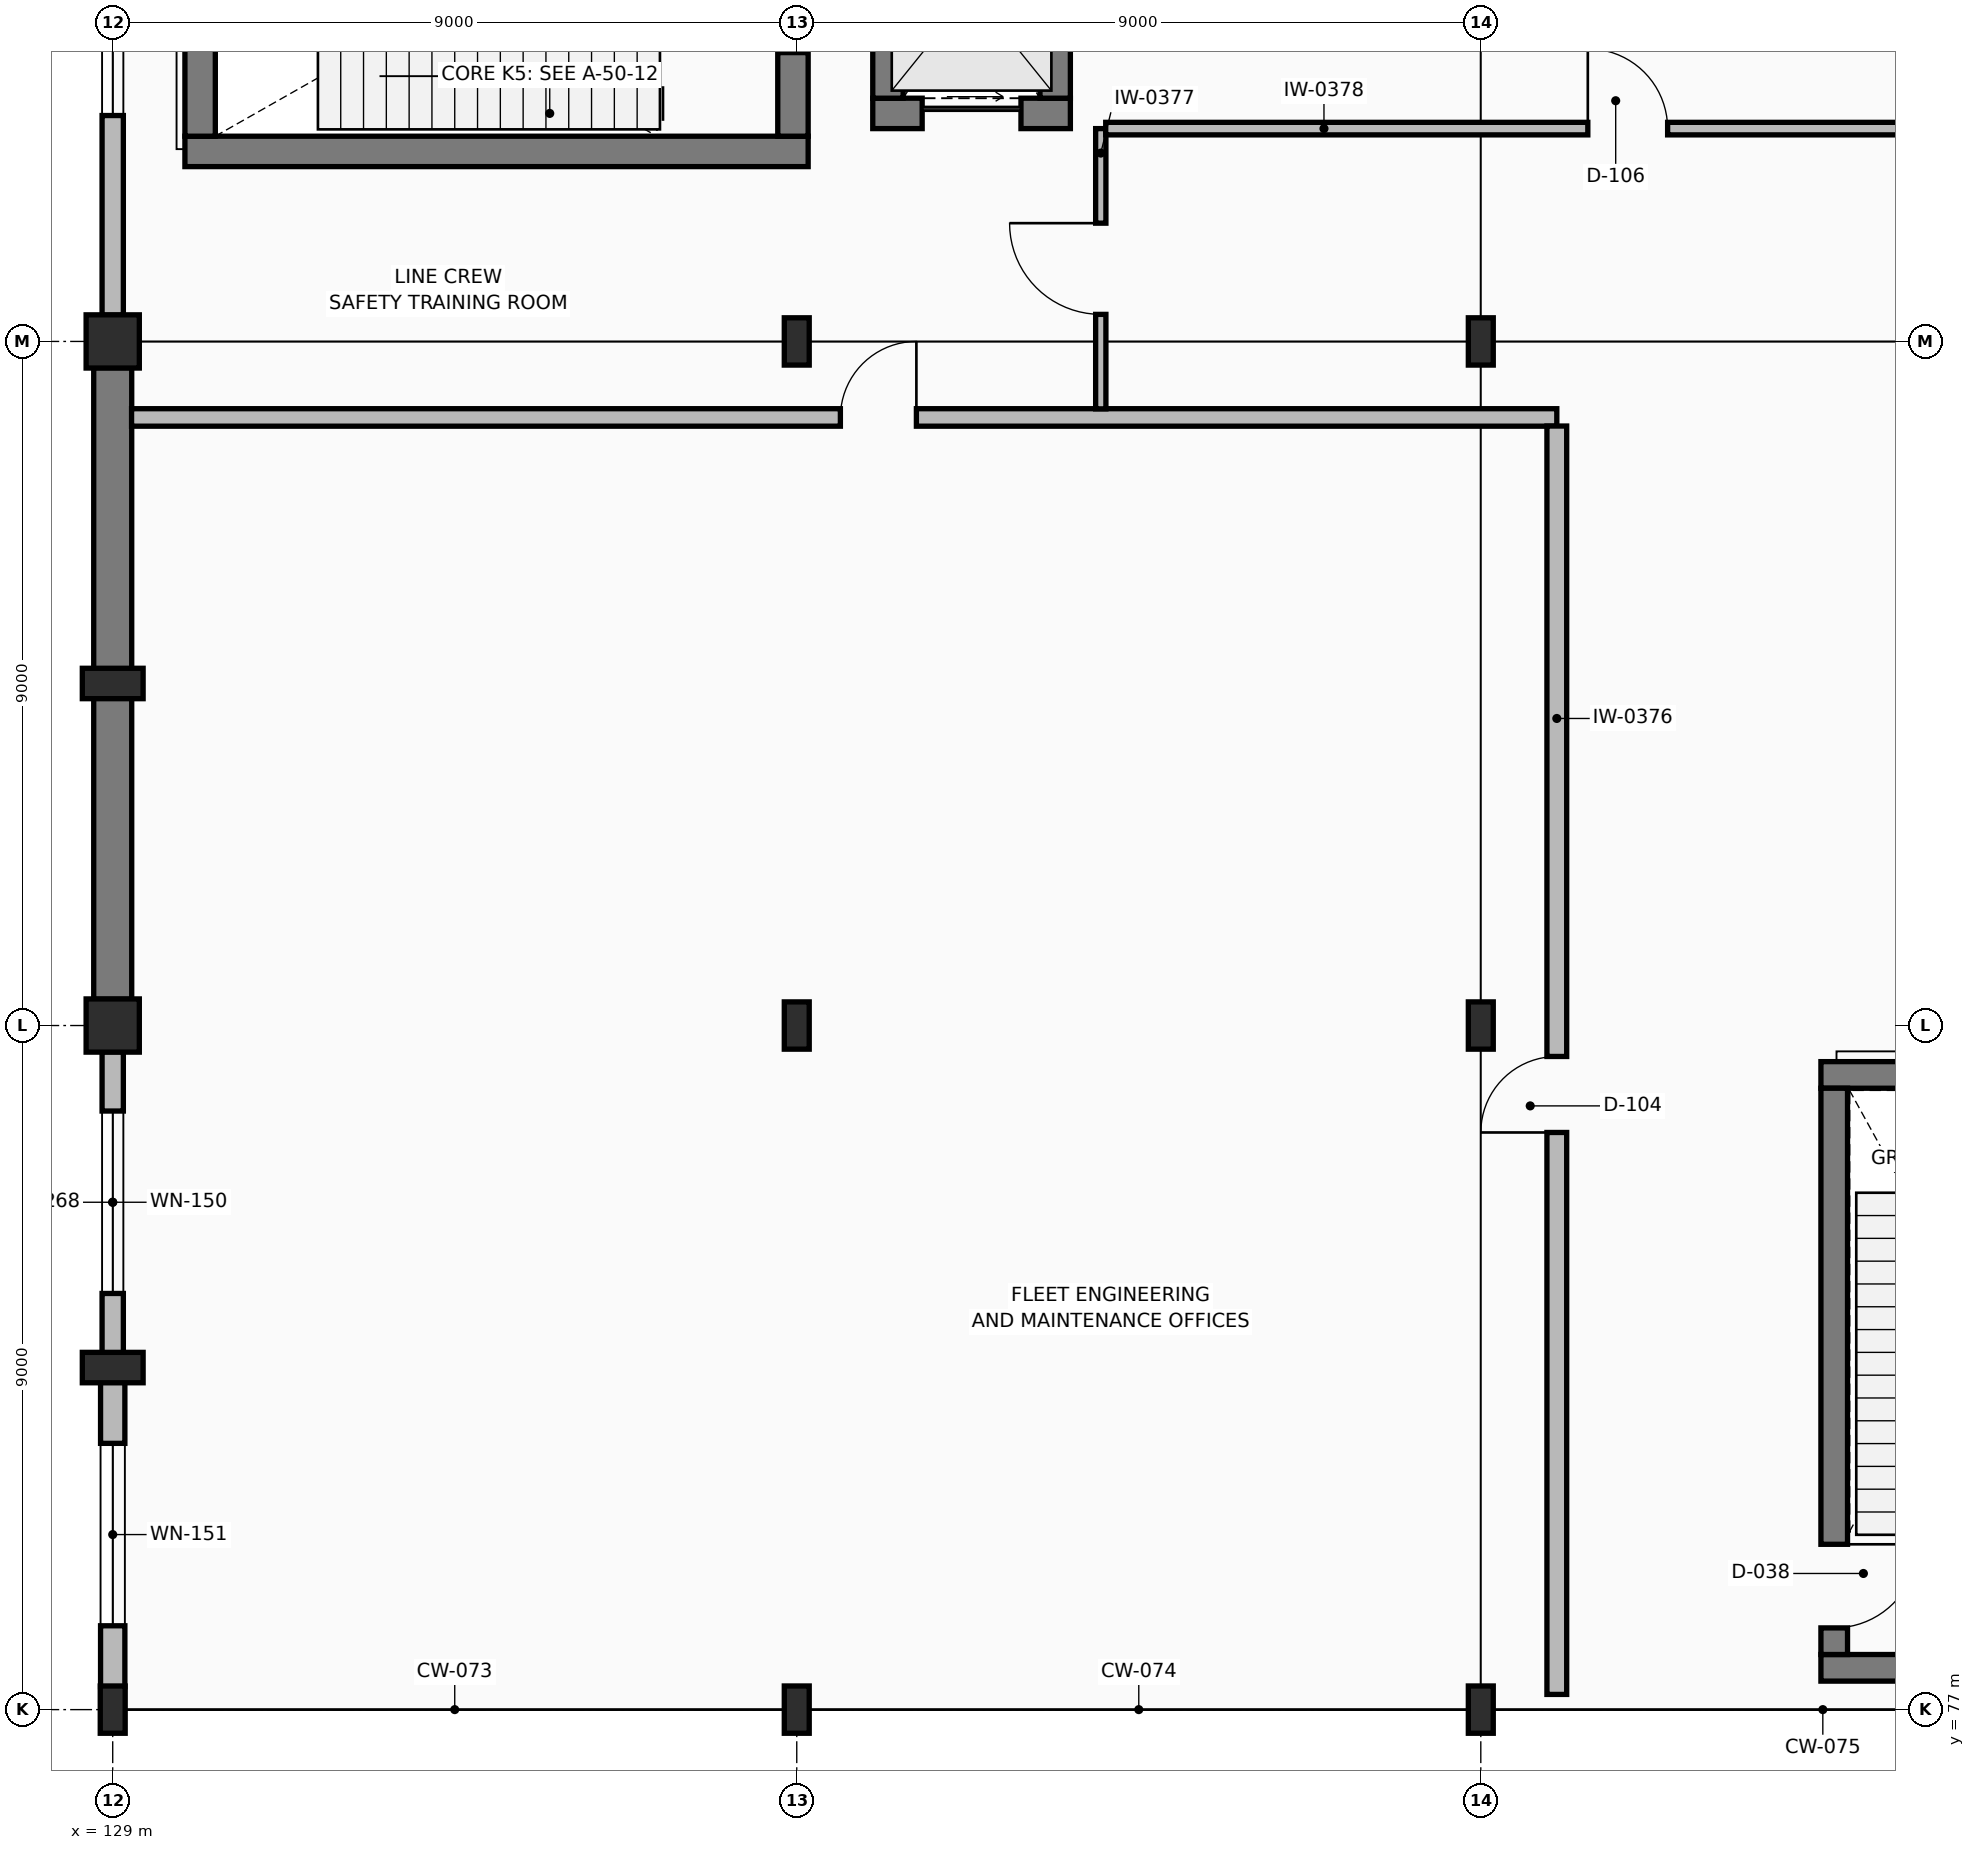
"""IFC4 building model, lengths in metres.
Left out: names, types, materials, properties, quantities, classifications, styles, units other than length and angle.
Written with IfcOpenShell. Run it as: python <this file> out.ifc"""

import sys

from ifc_helpers import new_model, si_unit, direction, frame, frame_2d, origin, origin_2d, place, context, subcontext, project, spatial, rectangle, i_section, extrude, element, fill, save


model = new_model("IFC4")
c1 = context("Model", 3, precision=1e-05, world=origin(), true_north=direction((0.0, 1.0)))
c2 = subcontext(c1, "Body", "Model", "MODEL_VIEW")
j1 = project(units=[si_unit("LENGTHUNIT", "METRE"), si_unit("PLANEANGLEUNIT", "RADIAN")], contexts=[c1])
p1 = place(None, origin())
s1 = spatial("IfcSite", under=j1, at=p1, CompositionType="ELEMENT")
p2 = place(p1, origin())
s2 = spatial("IfcBuilding", under=s1, at=p2, CompositionType="ELEMENT")
p3 = place(p2, frame((0.0, 0.0, 4.8)))
s3 = spatial("IfcBuildingStorey", under=s2, at=p3, CompositionType="ELEMENT", Elevation=4.8)
p4 = place(p3, frame((129.0, 77.0, 0.0), z_axis=(0.0, 0.0, 1.0), x_axis=(1.0, 0.0, 0.0)))
e1 = element("IfcColumn", 1, at=p4, inside=s3, PredefinedType="COLUMN", context=c2, shape_type="SweptSolid", body=[
    extrude(i_section(OverallWidth=0.328, OverallDepth=0.622, WebThickness=0.015, FlangeThickness=0.024, at=origin_2d()), origin(), (0.0, 0.0, 1.0), 4.8),
])
for number, where, z_axis, x_axis in (
    (2, (129.0, 86.0, 0.0), (0.0, 0.0, 1.0), (1.0, 0.0, 0.0)),
    (3, (129.0, 95.0, 0.0), (0.0, 0.0, 1.0), (1.0, 0.0, 0.0)),
):
    element("IfcColumn", number, at=place(p3, frame(where, z_axis=z_axis, x_axis=x_axis)), inside=s3, PredefinedType="COLUMN", context=c2, shape_type="SweptSolid", body=[
        extrude(rectangle(XDim=0.7, YDim=0.7, at=origin_2d()), origin(), (0.0, 0.0, 1.0), 4.8),
    ])
for number, where, z_axis, x_axis in (
    (4, (138.0, 77.0, 0.0), (0.0, 0.0, 1.0), (1.0, 0.0, 0.0)),
    (5, (138.0, 86.0, 0.0), (0.0, 0.0, 1.0), (1.0, 0.0, 0.0)),
    (6, (138.0, 95.0, 0.0), (0.0, 0.0, 1.0), (1.0, 0.0, 0.0)),
    (7, (147.0, 77.0, 0.0), (0.0, 0.0, 1.0), (1.0, 0.0, 0.0)),
    (8, (147.0, 86.0, 0.0), (0.0, 0.0, 1.0), (1.0, 0.0, 0.0)),
    (9, (147.0, 95.0, 0.0), (0.0, 0.0, 1.0), (1.0, 0.0, 0.0)),
):
    element("IfcColumn", number, at=place(p3, frame(where, z_axis=z_axis, x_axis=x_axis)), inside=s3, PredefinedType="COLUMN", context=c2, shape_type="SweptSolid", body=[
        extrude(i_section(OverallWidth=0.328, OverallDepth=0.622, WebThickness=0.015, FlangeThickness=0.024, at=origin_2d()), origin(), (0.0, 0.0, 1.0), 4.8),
    ])
for number, where, z_axis, x_axis in (
    (10, (129.0, 81.5, 0.0), (0.0, 0.0, 1.0), (0.0, 1.0, 0.0)),
    (11, (129.0, 90.5, 0.0), (0.0, 0.0, 1.0), (0.0, 1.0, 0.0)),
):
    element("IfcColumn", number, at=place(p3, frame(where, z_axis=z_axis, x_axis=x_axis)), inside=s3, PredefinedType="PILASTER", context=c2, shape_type="SweptSolid", body=[
        extrude(rectangle(XDim=0.4, YDim=0.8, at=origin_2d()), origin(), (0.0, 0.0, 1.0), 4.8),
    ])
p5 = place(p3, frame((129.0, 85.655, 0.0), z_axis=(0.0, 0.0, 1.0), x_axis=(0.0, -1.0, 0.0)))
e12 = element("IfcWall", 12, at=p5, inside=s3, PredefinedType="SOLIDWALL", context=c2, shape_type="SweptSolid", body=[
    extrude(rectangle(XDim=3.96, YDim=0.28, at=frame_2d((1.98, 0.0))), origin(), (0.0, 0.0, 1.0), 2.648),
])
p6 = place(p5, frame((0.78, 0.0, 0.9)))
e13 = element("IfcOpeningElement", 13, at=p6, cuts=e12, PredefinedType="OPENING", context=c2, shape_type="SweptSolid", body=[
    extrude(rectangle(XDim=2.4, YDim=1.5, at=frame_2d((1.2, 0.75))), frame((0.0, 0.15, 0.0), z_axis=(0.0, -1.0, 0.0), x_axis=(1.0, 0.0, 0.0)), (0.0, 0.0, 1.0), 0.3),
])
p7 = place(p3, frame((129.0, 81.305, 0.0), z_axis=(0.0, 0.0, 1.0), x_axis=(0.0, -1.0, 0.0)))
e14 = element("IfcWall", 14, at=p7, inside=s3, PredefinedType="SOLIDWALL", context=c2, shape_type="SweptSolid", body=[
    extrude(rectangle(XDim=4.004, YDim=0.32, at=frame_2d((2.002, 0.0))), origin(), (0.0, 0.0, 1.0), 2.648),
])
p8 = place(p7, frame((0.802, 0.0, 0.9)))
e15 = element("IfcOpeningElement", 15, at=p8, cuts=e14, PredefinedType="OPENING", context=c2, shape_type="SweptSolid", body=[
    extrude(rectangle(XDim=2.4, YDim=1.55, at=frame_2d((1.2, 0.775))), frame((0.0, 0.17, 0.0), z_axis=(0.0, -1.0, 0.0), x_axis=(1.0, 0.0, 0.0)), (0.0, 0.0, 1.0), 0.34),
])
for number, where, z_axis, x_axis in (
    (16, (129.0, 94.655, 0.0), (0.0, 0.0, 1.0), (0.0, -1.0, 0.0)),
    (17, (129.0, 90.305, 0.0), (0.0, 0.0, 1.0), (0.0, -1.0, 0.0)),
):
    element("IfcWall", number, at=place(p3, frame(where, z_axis=z_axis, x_axis=x_axis)), inside=s3, PredefinedType="SHEAR", context=c2, shape_type="SweptSolid", body=[
        extrude(rectangle(XDim=3.96, YDim=0.5, at=frame_2d((1.98, 0.0))), origin(), (0.0, 0.0, 1.0), 2.648),
    ])
p9 = place(p3, frame((129.0, 101.699, 0.0), z_axis=(0.0, 0.0, 1.0), x_axis=(0.0, -1.0, 0.0)))
e18 = element("IfcWall", 18, at=p9, inside=s3, PredefinedType="SOLIDWALL", context=c2, shape_type="SweptSolid", body=[
    extrude(rectangle(XDim=6.354, YDim=0.28, at=frame_2d((3.177, 0.0))), origin(), (0.0, 0.0, 1.0), 4.17),
])
p10 = place(p9, frame((1.127, 0.0, 0.9)))
e19 = element("IfcOpeningElement", 19, at=p10, cuts=e18, PredefinedType="OPENING", context=c2, shape_type="SweptSolid", body=[
    extrude(rectangle(XDim=2.6, YDim=1.55, at=frame_2d((1.3, 0.775))), frame((0.0, 0.15, 0.0), z_axis=(0.0, -1.0, 0.0), x_axis=(1.0, 0.0, 0.0)), (0.0, 0.0, 1.0), 0.3),
])
p11 = place(p3, frame((129.95, 97.5, 0.0), z_axis=(0.0, 0.0, 1.0), x_axis=(1.0, 0.0, 0.0)))
e20 = element("IfcWall", 20, at=p11, inside=s3, PredefinedType="SHEAR", context=c2, shape_type="SweptSolid", body=[
    extrude(rectangle(XDim=8.2, YDim=0.4, at=frame_2d((4.1, 0.0))), origin(), (0.0, 0.0, 1.0), 4.49),
])
p12 = place(p3, frame((137.95, 97.7, 0.0), z_axis=(0.0, 0.0, 1.0), x_axis=(0.0, 1.0, 0.0)))
e21 = element("IfcWall", 21, at=p12, inside=s3, PredefinedType="SHEAR", context=c2, shape_type="SweptSolid", body=[
    extrude(rectangle(XDim=3.3, YDim=0.4, at=frame_2d((1.65, 0.0))), origin(), (0.0, 0.0, 1.0), 4.49),
])
p13 = place(p12, frame((1.1, 0.0, 0.0)))
e22 = element("IfcOpeningElement", 22, at=p13, cuts=e21, PredefinedType="OPENING", context=c2, shape_type="SweptSolid", body=[
    extrude(rectangle(XDim=1.1, YDim=2.2, at=frame_2d((0.55, 1.1))), frame((0.0, 0.21, 0.0), z_axis=(0.0, -1.0, 0.0), x_axis=(1.0, 0.0, 0.0)), (0.0, 0.0, 1.0), 0.42),
])
p14 = place(p3, frame((130.15, 101.0, 0.0), z_axis=(0.0, 0.0, 1.0), x_axis=(0.0, -1.0, 0.0)))
e23 = element("IfcWall", 23, at=p14, inside=s3, PredefinedType="SHEAR", context=c2, shape_type="SweptSolid", body=[
    extrude(rectangle(XDim=3.3, YDim=0.4, at=frame_2d((1.65, 0.0))), origin(), (0.0, 0.0, 1.0), 4.49),
])
p15 = place(p3, frame((139.0, 98.0, 0.0), z_axis=(0.0, 0.0, 1.0), x_axis=(1.0, 0.0, 0.0)))
e24 = element("IfcWall", 24, at=p15, inside=s3, PredefinedType="SHEAR", context=c2, shape_type="SweptSolid", body=[
    extrude(rectangle(XDim=2.6, YDim=0.4, at=frame_2d((1.3, 0.0))), origin(), (0.0, 0.0, 1.0), 4.49),
])
p16 = place(p15, frame((0.65, 0.0, 0.0)))
e25 = element("IfcOpeningElement", 25, at=p16, cuts=e24, PredefinedType="OPENING", context=c2, shape_type="SweptSolid", body=[
    extrude(rectangle(XDim=1.3, YDim=2.25, at=frame_2d((0.65, 1.125))), frame((0.0, 0.21, 0.0), z_axis=(0.0, -1.0, 0.0), x_axis=(1.0, 0.0, 0.0)), (0.0, 0.0, 1.0), 0.42),
])
for number, where, z_axis, x_axis in (
    (26, (141.4, 98.2, 0.0), (0.0, 0.0, 1.0), (0.0, 1.0, 0.0)),
    (27, (139.2, 101.0, 0.0), (0.0, 0.0, 1.0), (0.0, -1.0, 0.0)),
):
    element("IfcWall", number, at=place(p3, frame(where, z_axis=z_axis, x_axis=x_axis)), inside=s3, PredefinedType="SHEAR", context=c2, shape_type="SweptSolid", body=[
        extrude(rectangle(XDim=2.8, YDim=0.4, at=frame_2d((1.4, 0.0))), origin(), (0.0, 0.0, 1.0), 4.49),
    ])
for number, where, z_axis, x_axis in (
    (28, (151.475, 77.55, 0.0), (0.0, 0.0, 1.0), (1.0, 0.0, 0.0)),
    (29, (155.425, 85.35, 0.0), (0.0, 0.0, 1.0), (-1.0, 0.0, 0.0)),
):
    element("IfcWall", number, at=place(p3, frame(where, z_axis=z_axis, x_axis=x_axis)), inside=s3, PredefinedType="SHEAR", context=c2, shape_type="SweptSolid", body=[
        extrude(rectangle(XDim=3.95, YDim=0.35, at=frame_2d((1.975, 0.0))), origin(), (0.0, 0.0, 1.0), 4.49),
    ])
p17 = place(p3, frame((151.65, 85.175, 0.0), z_axis=(0.0, 0.0, 1.0), x_axis=(0.0, -1.0, 0.0)))
e30 = element("IfcWall", 30, at=p17, inside=s3, PredefinedType="SHEAR", context=c2, shape_type="SweptSolid", body=[
    extrude(rectangle(XDim=7.45, YDim=0.35, at=frame_2d((3.725, 0.0))), origin(), (0.0, 0.0, 1.0), 4.49),
])
p18 = place(p17, frame((6.0, 0.0, 0.0)))
e31 = element("IfcOpeningElement", 31, at=p18, cuts=e30, PredefinedType="OPENING", context=c2, shape_type="SweptSolid", body=[
    extrude(rectangle(XDim=1.1, YDim=2.2, at=frame_2d((0.55, 1.1))), frame((0.0, 0.185, 0.0), z_axis=(0.0, -1.0, 0.0), x_axis=(1.0, 0.0, 0.0)), (0.0, 0.0, 1.0), 0.37),
])
p19 = place(p3, frame((129.248, 94.0, 0.0), z_axis=(0.0, 0.0, 1.0), x_axis=(1.0, 0.0, 0.0)))
e32 = element("IfcWall", 32, at=p19, inside=s3, PredefinedType="PARTITIONING", context=c2, shape_type="SweptSolid", body=[
    extrude(rectangle(XDim=18.752, YDim=0.23, at=frame_2d((9.376, 0.0))), origin(), (0.0, 0.0, 1.0), 3.698),
])
p20 = place(p19, frame((9.326, 0.0, 0.0)))
e33 = element("IfcOpeningElement", 33, at=p20, cuts=e32, PredefinedType="OPENING", context=c2, shape_type="SweptSolid", body=[
    extrude(rectangle(XDim=1.0, YDim=2.15, at=frame_2d((0.5, 1.075))), frame((0.0, 0.125, 0.0), z_axis=(0.0, -1.0, 0.0), x_axis=(1.0, 0.0, 0.0)), (0.0, 0.0, 1.0), 0.25),
])
p21 = place(p3, frame((148.0, 77.2, 0.0), z_axis=(0.0, 0.0, 1.0), x_axis=(0.0, 1.0, 0.0)))
e34 = element("IfcWall", 34, at=p21, inside=s3, PredefinedType="PARTITIONING", context=c2, shape_type="SweptSolid", body=[
    extrude(rectangle(XDim=16.687, YDim=0.26, at=frame_2d((8.344, 0.0))), origin(), (0.0, 0.0, 1.0), 3.698),
])
p22 = place(p21, frame((7.393, 0.0, 0.0)))
e35 = element("IfcOpeningElement", 35, at=p22, cuts=e34, PredefinedType="OPENING", context=c2, shape_type="SweptSolid", body=[
    extrude(rectangle(XDim=1.0, YDim=2.15, at=frame_2d((0.5, 1.075))), frame((0.0, 0.14, 0.0), z_axis=(0.0, -1.0, 0.0), x_axis=(1.0, 0.0, 0.0)), (0.0, 0.0, 1.0), 0.28),
])
p23 = place(p3, frame((142.0, 94.113, 0.0), z_axis=(0.0, 0.0, 1.0), x_axis=(0.0, 1.0, 0.0)))
e36 = element("IfcWall", 36, at=p23, inside=s3, PredefinedType="PARTITIONING", context=c2, shape_type="SweptSolid", body=[
    extrude(rectangle(XDim=3.687, YDim=0.135, at=frame_2d((1.844, 0.0))), origin(), (0.0, 0.0, 1.0), 3.698),
])
p24 = place(p23, frame((1.243, 0.0, 0.0)))
e37 = element("IfcOpeningElement", 37, at=p24, cuts=e36, PredefinedType="OPENING", context=c2, shape_type="SweptSolid", body=[
    extrude(rectangle(XDim=1.2, YDim=2.2, at=frame_2d((0.6, 1.1))), frame((0.0, 0.077, 0.0), z_axis=(0.0, -1.0, 0.0), x_axis=(1.0, 0.0, 0.0)), (0.0, 0.0, 1.0), 0.155),
])
p25 = place(p3, frame((142.065, 97.8, 0.0), z_axis=(0.0, 0.0, 1.0), x_axis=(1.0, 0.0, 0.0)))
e38 = element("IfcWall", 38, at=p25, inside=s3, PredefinedType="PARTITIONING", context=c2, shape_type="SweptSolid", body=[
    extrude(rectangle(XDim=13.735, YDim=0.165, at=frame_2d((6.868, 0.0))), origin(), (0.0, 0.0, 1.0), 3.698),
])
p26 = place(p25, frame((6.343, 0.0, 0.0)))
e39 = element("IfcOpeningElement", 39, at=p26, cuts=e38, PredefinedType="OPENING", context=c2, shape_type="SweptSolid", body=[
    extrude(rectangle(XDim=1.05, YDim=2.15, at=frame_2d((0.525, 1.075))), frame((0.0, 0.093, 0.0), z_axis=(0.0, -1.0, 0.0), x_axis=(1.0, 0.0, 0.0)), (0.0, 0.0, 1.0), 0.185),
])
p27 = place(p6, origin())
e40 = element("IfcWindow", 40, at=p27, inside=s3, PartitioningType="SINGLE_PANEL", PredefinedType="WINDOW", context=c2, shape_type="SweptSolid", body=[
    extrude(rectangle(XDim=2.4, YDim=1.5, at=frame_2d((1.2, 0.75))), frame((0.0, 0.03, 0.0), z_axis=(0.0, -1.0, 0.0), x_axis=(1.0, 0.0, 0.0)), (0.0, 0.0, 1.0), 0.06),
])
fill(e13, e40)
p28 = place(p8, origin())
e41 = element("IfcWindow", 41, at=p28, inside=s3, PartitioningType="SINGLE_PANEL", PredefinedType="WINDOW", context=c2, shape_type="SweptSolid", body=[
    extrude(rectangle(XDim=2.4, YDim=1.55, at=frame_2d((1.2, 0.775))), frame((0.0, 0.03, 0.0), z_axis=(0.0, -1.0, 0.0), x_axis=(1.0, 0.0, 0.0)), (0.0, 0.0, 1.0), 0.06),
])
fill(e15, e41)
p29 = place(p10, origin())
e42 = element("IfcWindow", 42, at=p29, inside=s3, PartitioningType="SINGLE_PANEL", PredefinedType="WINDOW", context=c2, shape_type="SweptSolid", body=[
    extrude(rectangle(XDim=2.6, YDim=1.55, at=frame_2d((1.3, 0.775))), frame((0.0, 0.03, 0.0), z_axis=(0.0, -1.0, 0.0), x_axis=(1.0, 0.0, 0.0)), (0.0, 0.0, 1.0), 0.06),
])
fill(e19, e42)
p30 = place(p16, origin())
e43 = element("IfcDoor", 43, at=p30, inside=s3, OperationType="SLIDING_TO_RIGHT", PredefinedType="DOOR", context=c2, shape_type="SweptSolid", body=[
    extrude(rectangle(XDim=1.3, YDim=2.25, at=frame_2d((0.65, 1.125))), frame((0.0, 0.025, 0.0), z_axis=(0.0, -1.0, 0.0), x_axis=(1.0, 0.0, 0.0)), (0.0, 0.0, 1.0), 0.05),
])
fill(e25, e43)
p31 = place(p18, origin())
e44 = element("IfcDoor", 44, at=p31, inside=s3, OperationType="SINGLE_SWING_LEFT", PredefinedType="DOOR", context=c2, shape_type="SweptSolid", body=[
    extrude(rectangle(XDim=1.1, YDim=2.2, at=frame_2d((0.55, 1.1))), frame((0.0, 0.025, 0.0), z_axis=(0.0, -1.0, 0.0), x_axis=(1.0, 0.0, 0.0)), (0.0, 0.0, 1.0), 0.05),
])
fill(e31, e44)
p32 = place(p20, origin())
e45 = element("IfcDoor", 45, at=p32, inside=s3, OperationType="SINGLE_SWING_RIGHT", PredefinedType="DOOR", context=c2, shape_type="SweptSolid", body=[
    extrude(rectangle(XDim=1.0, YDim=2.15, at=frame_2d((0.5, 1.075))), frame((0.0, 0.025, 0.0), z_axis=(0.0, -1.0, 0.0), x_axis=(1.0, 0.0, 0.0)), (0.0, 0.0, 1.0), 0.05),
])
fill(e33, e45)
p33 = place(p22, origin())
e46 = element("IfcDoor", 46, at=p33, inside=s3, OperationType="SINGLE_SWING_LEFT", PredefinedType="DOOR", context=c2, shape_type="SweptSolid", body=[
    extrude(rectangle(XDim=1.0, YDim=2.15, at=frame_2d((0.5, 1.075))), frame((0.0, 0.025, 0.0), z_axis=(0.0, -1.0, 0.0), x_axis=(1.0, 0.0, 0.0)), (0.0, 0.0, 1.0), 0.05),
])
fill(e35, e46)
p34 = place(p24, origin())
e47 = element("IfcDoor", 47, at=p34, inside=s3, OperationType="SINGLE_SWING_RIGHT", PredefinedType="DOOR", context=c2, shape_type="SweptSolid", body=[
    extrude(rectangle(XDim=1.2, YDim=2.2, at=frame_2d((0.6, 1.1))), frame((0.0, 0.025, 0.0), z_axis=(0.0, -1.0, 0.0), x_axis=(1.0, 0.0, 0.0)), (0.0, 0.0, 1.0), 0.05),
])
fill(e37, e47)
p35 = place(p26, origin())
e48 = element("IfcDoor", 48, at=p35, inside=s3, OperationType="SINGLE_SWING_LEFT", PredefinedType="DOOR", context=c2, shape_type="SweptSolid", body=[
    extrude(rectangle(XDim=1.05, YDim=2.15, at=frame_2d((0.525, 1.075))), frame((0.0, 0.025, 0.0), z_axis=(0.0, -1.0, 0.0), x_axis=(1.0, 0.0, 0.0)), (0.0, 0.0, 1.0), 0.05),
])
fill(e39, e48)
save(model, sys.argv[1])
